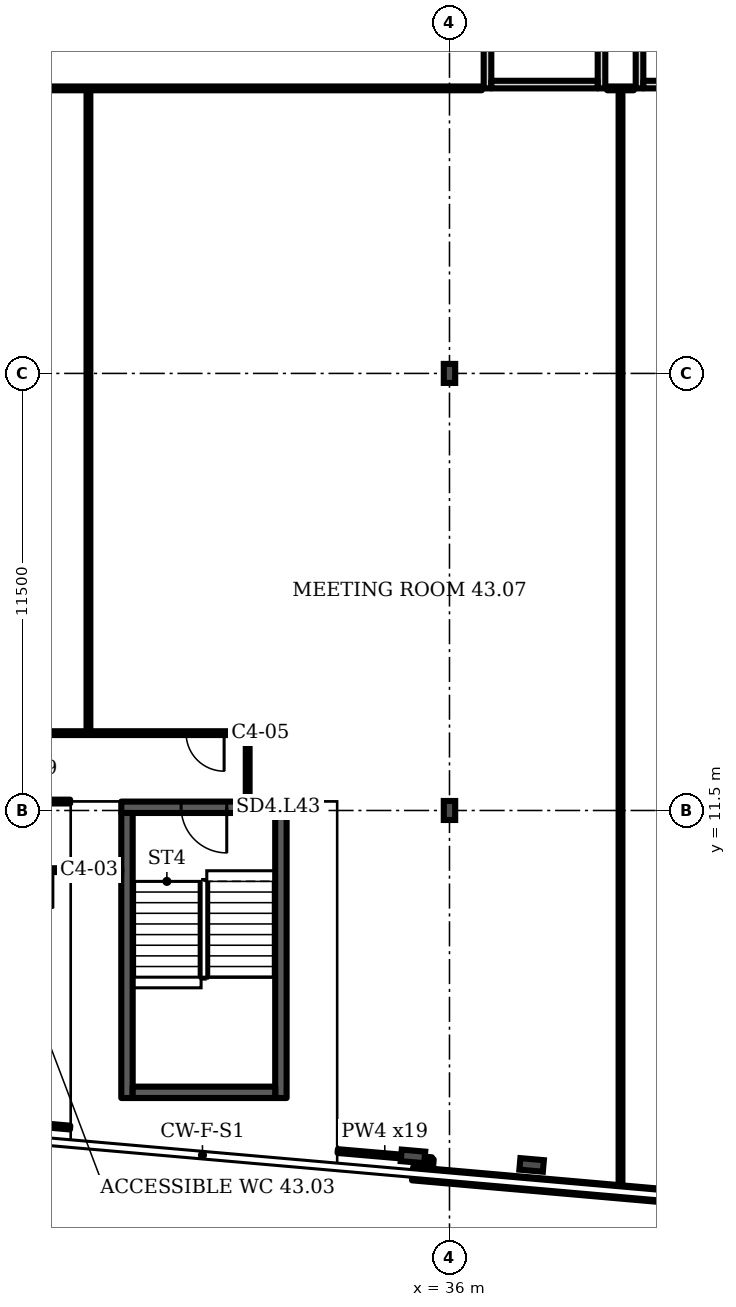
"""IFC4 building model, lengths in metres.
Left out: names, types, materials, properties, quantities, classifications, styles, units other than length and angle.
Written with IfcOpenShell. Run it as: python <this file> out.ifc"""

import sys

from ifc_helpers import new_model, si_unit, direction, frame, frame_2d, origin, origin_2d, place, context, subcontext, project, spatial, rectangle, i_section, extrude, element, fill, save


model = new_model("IFC4")
c1 = context("Model", 3, precision=1e-05, world=origin(), true_north=direction((0.0, 1.0)))
c2 = subcontext(c1, "Body", "Model", "MODEL_VIEW")
j1 = project(units=[si_unit("LENGTHUNIT", "METRE"), si_unit("PLANEANGLEUNIT", "RADIAN")], contexts=[c1])
p1 = place(None, origin())
s1 = spatial("IfcSite", under=j1, at=p1, CompositionType="ELEMENT")
p2 = place(p1, origin())
s2 = spatial("IfcBuilding", under=s1, at=p2, CompositionType="ELEMENT")
p3 = place(p2, frame((0.0, 0.0, 177.1)))
s3 = spatial("IfcBuildingStorey", under=s2, at=p3, CompositionType="ELEMENT", Elevation=177.1)
for number, where, z_axis, x_axis in (
    (1, (35.039, 2.399, 0.0), (0.0, 0.0, 1.0), (-0.087, -0.996, 0.0)),
    (2, (38.161, 2.174, 0.0), (0.0, 0.0, 1.0), (-0.087, -0.996, 0.0)),
):
    element("IfcColumn", number, at=place(p3, frame(where, z_axis=z_axis, x_axis=x_axis)), inside=s3, PredefinedType="COLUMN", context=c2, shape_type="SweptSolid", body=[
        extrude(i_section(OverallWidth=0.305, OverallDepth=0.62, WebThickness=0.021, FlangeThickness=0.04, FilletRadius=0.027, at=origin_2d()), origin(), (0.0, 0.0, 1.0), 3.6),
    ])
for number, where, z_axis, x_axis in (
    (3, (36.0, 11.5, 0.0), (0.0, 0.0, 1.0), (1.0, 0.0, 0.0)),
    (4, (36.0, 23.0, 0.0), (0.0, 0.0, 1.0), (1.0, 0.0, 0.0)),
):
    element("IfcColumn", number, at=place(p3, frame(where, z_axis=z_axis, x_axis=x_axis)), inside=s3, PredefinedType="COLUMN", context=c2, shape_type="SweptSolid", body=[
        extrude(i_section(OverallWidth=0.3, OverallDepth=0.5, WebThickness=0.014, FlangeThickness=0.028, FilletRadius=0.027, at=origin_2d()), origin(), (0.0, 0.0, 1.0), 3.6),
    ])
p4 = place(p3, frame((35.03, 1.943, 0.0), z_axis=(0.0, 0.0, 1.0), x_axis=(0.996199, -0.08714, 0.0)))
e5 = element("IfcWall", 5, at=p4, inside=s3, PredefinedType="SOLIDWALL", context=c2, shape_type="SweptSolid", body=[
    extrude(rectangle(XDim=11.028, YDim=0.35, at=frame_2d((5.514, 0.0))), origin(), (0.0, 0.0, 1.0), 1.0),
])
p5 = place(p3, frame((37.0, 30.5, 0.0), z_axis=(0.0, 0.0, 1.0), x_axis=(0.0, 1.0, 0.0)))
e6 = element("IfcWall", 6, at=p5, inside=s3, PredefinedType="PARTITIONING", context=c2, shape_type="SweptSolid", body=[
    extrude(rectangle(XDim=3.5, YDim=0.2, at=frame_2d((1.75, 0.0))), origin(), (0.0, 0.0, 1.0), 3.2),
])
p6 = place(p5, frame((1.2, 0.0, 0.0)))
e7 = element("IfcOpeningElement", 7, at=p6, cuts=e6, PredefinedType="OPENING", context=c2, shape_type="SweptSolid", body=[
    extrude(rectangle(XDim=1.1, YDim=2.1, at=frame_2d((0.55, 1.05))), frame((0.0, 0.11, 0.0), z_axis=(0.0, -1.0, 0.0), x_axis=(1.0, 0.0, 0.0)), (0.0, 0.0, 1.0), 0.22),
])
p7 = place(p3, frame((40.0, 30.5, 0.0), z_axis=(0.0, 0.0, 1.0), x_axis=(0.0, 1.0, 0.0)))
e8 = element("IfcWall", 8, at=p7, inside=s3, PredefinedType="PARTITIONING", context=c2, shape_type="SweptSolid", body=[
    extrude(rectangle(XDim=3.5, YDim=0.2, at=frame_2d((1.75, 0.0))), origin(), (0.0, 0.0, 1.0), 3.2),
])
p8 = place(p3, frame((37.1, 30.6, 0.0), z_axis=(0.0, 0.0, 1.0), x_axis=(1.0, 0.0, 0.0)))
e9 = element("IfcWall", 9, at=p8, inside=s3, PredefinedType="PARTITIONING", context=c2, shape_type="SweptSolid", body=[
    extrude(rectangle(XDim=2.8, YDim=0.2, at=frame_2d((1.4, 0.0))), origin(), (0.0, 0.0, 1.0), 3.2),
])
p9 = place(p3, frame((41.0, 30.5, 0.0), z_axis=(0.0, 0.0, 1.0), x_axis=(0.0, 1.0, 0.0)))
e10 = element("IfcWall", 10, at=p9, inside=s3, PredefinedType="PARTITIONING", context=c2, shape_type="SweptSolid", body=[
    extrude(rectangle(XDim=3.5, YDim=0.2, at=frame_2d((1.75, 0.0))), origin(), (0.0, 0.0, 1.0), 3.2),
])
p10 = place(p3, frame((41.1, 30.6, 0.0), z_axis=(0.0, 0.0, 1.0), x_axis=(1.0, 0.0, 0.0)))
e11 = element("IfcWall", 11, at=p10, inside=s3, PredefinedType="PARTITIONING", context=c2, shape_type="SweptSolid", body=[
    extrude(rectangle(XDim=2.8, YDim=0.2, at=frame_2d((1.4, 0.0))), origin(), (0.0, 0.0, 1.0), 3.2),
])
p11 = place(p3, frame((27.364, 11.584, 0.0), z_axis=(0.0, 0.0, 1.0), x_axis=(1.0, 0.0, 0.0)))
e12 = element("IfcWall", 12, at=p11, inside=s3, PredefinedType="SHEAR", context=c2, shape_type="SweptSolid", body=[
    extrude(rectangle(XDim=4.35, YDim=0.3, at=frame_2d((2.175, 0.0))), origin(), (0.0, 0.0, 1.0), 3.2),
])
p12 = place(p11, frame((1.575, 0.0, 0.0)))
e13 = element("IfcOpeningElement", 13, at=p12, cuts=e12, PredefinedType="OPENING", context=c2, shape_type="SweptSolid", body=[
    extrude(rectangle(XDim=1.2, YDim=2.1, at=frame_2d((0.6, 1.05))), frame((0.0, 0.16, 0.0), z_axis=(0.0, -1.0, 0.0), x_axis=(1.0, 0.0, 0.0)), (0.0, 0.0, 1.0), 0.32),
])
p13 = place(p3, frame((16.9, 11.735, 0.0), z_axis=(0.0, 0.0, 1.0), x_axis=(1.0, 0.0, 0.0)))
e14 = element("IfcWall", 14, at=p13, inside=s3, PredefinedType="PARTITIONING", context=c2, shape_type="SweptSolid", body=[
    extrude(rectangle(XDim=9.119, YDim=0.1, at=frame_2d((4.56, 0.0))), origin(), (0.0, 0.0, 1.0), 3.2),
])
p14 = place(p13, frame((0.155, 0.0, 0.0)))
e15 = element("IfcOpeningElement", 15, at=p14, cuts=e14, PredefinedType="OPENING", context=c2, shape_type="SweptSolid", body=[
    extrude(rectangle(XDim=1.8, YDim=2.1, at=frame_2d((0.9, 1.05))), frame((0.0, 0.06, 0.0), z_axis=(0.0, -1.0, 0.0), x_axis=(1.0, 0.0, 0.0)), (0.0, 0.0, 1.0), 0.12),
])
p15 = place(p3, frame((17.8, 30.5, 0.0), z_axis=(0.0, 0.0, 1.0), x_axis=(1.0, 0.0, 0.0)))
e16 = element("IfcWall", 16, at=p15, inside=s3, PredefinedType="PARTITIONING", context=c2, shape_type="SweptSolid", body=[
    extrude(rectangle(XDim=19.05, YDim=0.1, at=frame_2d((9.525, 0.0))), origin(), (0.0, 0.0, 1.0), 3.2),
])
p16 = place(p3, frame((18.5, 9.93, 0.0), z_axis=(0.0, 0.0, 1.0), x_axis=(1.0, 0.0, 0.0)))
e17 = element("IfcWall", 17, at=p16, inside=s3, PredefinedType="PARTITIONING", context=c2, shape_type="SweptSolid", body=[
    extrude(rectangle(XDim=8.864, YDim=0.1, at=frame_2d((4.432, 0.0))), origin(), (0.0, 0.0, 1.0), 3.2),
])
p17 = place(p16, frame((1.073, 0.0, 0.0)))
e18 = element("IfcOpeningElement", 18, at=p17, cuts=e17, PredefinedType="OPENING", context=c2, shape_type="SweptSolid", body=[
    extrude(rectangle(XDim=0.9, YDim=2.1, at=frame_2d((0.45, 1.05))), frame((0.0, 0.06, 0.0), z_axis=(0.0, -1.0, 0.0), x_axis=(1.0, 0.0, 0.0)), (0.0, 0.0, 1.0), 0.12),
])
p18 = place(p16, frame((3.808, 0.0, 0.0)))
e19 = element("IfcOpeningElement", 19, at=p18, cuts=e17, PredefinedType="OPENING", context=c2, shape_type="SweptSolid", body=[
    extrude(rectangle(XDim=0.9, YDim=2.1, at=frame_2d((0.45, 1.05))), frame((0.0, 0.06, 0.0), z_axis=(0.0, -1.0, 0.0), x_axis=(1.0, 0.0, 0.0)), (0.0, 0.0, 1.0), 0.12),
])
p19 = place(p16, frame((6.063, 0.0, 0.0)))
e20 = element("IfcOpeningElement", 20, at=p19, cuts=e17, PredefinedType="OPENING", context=c2, shape_type="SweptSolid", body=[
    extrude(rectangle(XDim=1.0, YDim=2.1, at=frame_2d((0.5, 1.05))), frame((0.0, 0.06, 0.0), z_axis=(0.0, -1.0, 0.0), x_axis=(1.0, 0.0, 0.0)), (0.0, 0.0, 1.0), 0.12),
])
p20 = place(p3, frame((18.7, 13.535, 0.0), z_axis=(0.0, 0.0, 1.0), x_axis=(1.0, 0.0, 0.0)))
e21 = element("IfcWall", 21, at=p20, inside=s3, PredefinedType="PARTITIONING", context=c2, shape_type="SweptSolid", body=[
    extrude(rectangle(XDim=11.99, YDim=0.1, at=frame_2d((5.995, 0.0))), origin(), (0.0, 0.0, 1.0), 3.2),
])
p21 = place(p20, frame((10.37, 0.0, 0.0)))
e22 = element("IfcOpeningElement", 22, at=p21, cuts=e21, PredefinedType="OPENING", context=c2, shape_type="SweptSolid", body=[
    extrude(rectangle(XDim=1.0, YDim=2.1, at=frame_2d((0.5, 1.05))), frame((0.0, 0.06, 0.0), z_axis=(0.0, -1.0, 0.0), x_axis=(1.0, 0.0, 0.0)), (0.0, 0.0, 1.0), 0.12),
])
p22 = place(p3, frame((26.019, 3.157, 0.0), z_axis=(0.0, 0.0, 1.0), x_axis=(-0.996266, 0.086322, 0.0)))
e23 = element("IfcWall", 23, at=p22, inside=s3, PredefinedType="PARTITIONING", context=c2, shape_type="SweptSolid", body=[
    extrude(rectangle(XDim=4.556, YDim=0.1, at=frame_2d((2.278, 0.0))), origin(), (0.0, 0.0, 1.0), 2.58),
])
p23 = place(p3, frame((26.5, 13.535, 0.0), z_axis=(0.0, 0.0, 1.0), x_axis=(0.0, 1.0, 0.0)))
e24 = element("IfcWall", 24, at=p23, inside=s3, PredefinedType="PARTITIONING", context=c2, shape_type="SweptSolid", body=[
    extrude(rectangle(XDim=16.965, YDim=0.1, at=frame_2d((8.482, 0.0))), origin(), (0.0, 0.0, 1.0), 3.2),
])
p24 = place(p3, frame((30.69, 11.754, 0.0), z_axis=(0.0, 0.0, 1.0), x_axis=(0.0, 1.0, 0.0)))
e25 = element("IfcWall", 25, at=p24, inside=s3, PredefinedType="PARTITIONING", context=c2, shape_type="SweptSolid", body=[
    extrude(rectangle(XDim=1.781, YDim=0.1, at=frame_2d((0.89, 0.0))), origin(), (0.0, 0.0, 1.0), 3.2),
])
p25 = place(p3, frame((35.502, 1.927, 0.0), z_axis=(0.0, 0.0, 1.0), x_axis=(0.083045, 0.996542, 0.0)))
e26 = element("IfcWall", 26, at=p25, inside=s3, PredefinedType="PARTITIONING", context=c2, shape_type="SweptSolid", body=[
    extrude(rectangle(XDim=0.4, YDim=0.1, at=frame_2d((0.2, 0.0))), origin(), (0.0, 0.0, 1.0), 3.2),
])
p26 = place(p3, frame((35.535, 2.325, 0.0), z_axis=(0.0, 0.0, 1.0), x_axis=(-0.996311, 0.085867, 0.0)))
e27 = element("IfcWall", 27, at=p26, inside=s3, PredefinedType="PARTITIONING", context=c2, shape_type="SweptSolid", body=[
    extrude(rectangle(XDim=2.485, YDim=0.1, at=frame_2d((1.243, 0.0))), origin(), (0.0, 0.0, 1.0), 2.58),
])
p27 = place(p3, frame((40.5, 1.489, 0.0), z_axis=(0.0, 0.0, 1.0), x_axis=(0.0, 1.0, 0.0)))
e28 = element("IfcWall", 28, at=p27, inside=s3, PredefinedType="PARTITIONING", context=c2, shape_type="SweptSolid", body=[
    extrude(rectangle(XDim=29.011, YDim=0.1, at=frame_2d((14.505, 0.0))), origin(), (0.0, 0.0, 1.0), 3.2),
])
p28 = place(p3, frame((40.15, 30.5, 0.0), z_axis=(0.0, 0.0, 1.0), x_axis=(1.0, 0.0, 0.0)))
e29 = element("IfcWall", 29, at=p28, inside=s3, PredefinedType="PARTITIONING", context=c2, shape_type="SweptSolid", body=[
    extrude(rectangle(XDim=0.7, YDim=0.1, at=frame_2d((0.35, 0.0))), origin(), (0.0, 0.0, 1.0), 3.2),
])
for number, where, z_axis, x_axis in (
    (30, (27.514, 3.934, 0.0), (0.0, 0.0, 1.0), (0.0, 1.0, 0.0)),
    (31, (31.564, 3.934, 0.0), (0.0, 0.0, 1.0), (0.0, 1.0, 0.0)),
):
    element("IfcWall", number, at=place(p3, frame(where, z_axis=z_axis, x_axis=x_axis)), inside=s3, PredefinedType="SHEAR", context=c2, shape_type="SweptSolid", body=[
        extrude(rectangle(XDim=7.5, YDim=0.3, at=frame_2d((3.75, 0.0))), origin(), (0.0, 0.0, 1.0), 3.2),
    ])
p29 = place(p3, frame((27.664, 4.084, 0.0), z_axis=(0.0, 0.0, 1.0), x_axis=(1.0, 0.0, 0.0)))
e32 = element("IfcWall", 32, at=p29, inside=s3, PredefinedType="SHEAR", context=c2, shape_type="SweptSolid", body=[
    extrude(rectangle(XDim=3.75, YDim=0.3, at=frame_2d((1.875, 0.0))), origin(), (0.0, 0.0, 1.0), 3.2),
])
p30 = place(p12, origin())
e33 = element("IfcDoor", 33, at=p30, inside=s3, OperationType="SINGLE_SWING_RIGHT", PredefinedType="DOOR", context=c2, shape_type="SweptSolid", body=[
    extrude(rectangle(XDim=1.2, YDim=2.1, at=frame_2d((0.6, 1.05))), frame((0.0, 0.025, 0.0), z_axis=(0.0, -1.0, 0.0), x_axis=(1.0, 0.0, 0.0)), (0.0, 0.0, 1.0), 0.05),
])
fill(e13, e33)
p31 = place(p19, origin())
e34 = element("IfcDoor", 34, at=p31, inside=s3, OperationType="SINGLE_SWING_RIGHT", PredefinedType="DOOR", context=c2, shape_type="SweptSolid", body=[
    extrude(rectangle(XDim=1.0, YDim=2.1, at=frame_2d((0.5, 1.05))), frame((0.0, 0.025, 0.0), z_axis=(0.0, -1.0, 0.0), x_axis=(1.0, 0.0, 0.0)), (0.0, 0.0, 1.0), 0.05),
])
fill(e20, e34)
p32 = place(p21, origin())
e35 = element("IfcDoor", 35, at=p32, inside=s3, OperationType="SINGLE_SWING_RIGHT", PredefinedType="DOOR", context=c2, shape_type="SweptSolid", body=[
    extrude(rectangle(XDim=1.0, YDim=2.1, at=frame_2d((0.5, 1.05))), frame((0.0, 0.025, 0.0), z_axis=(0.0, -1.0, 0.0), x_axis=(1.0, 0.0, 0.0)), (0.0, 0.0, 1.0), 0.05),
])
fill(e22, e35)
save(model, sys.argv[1])
